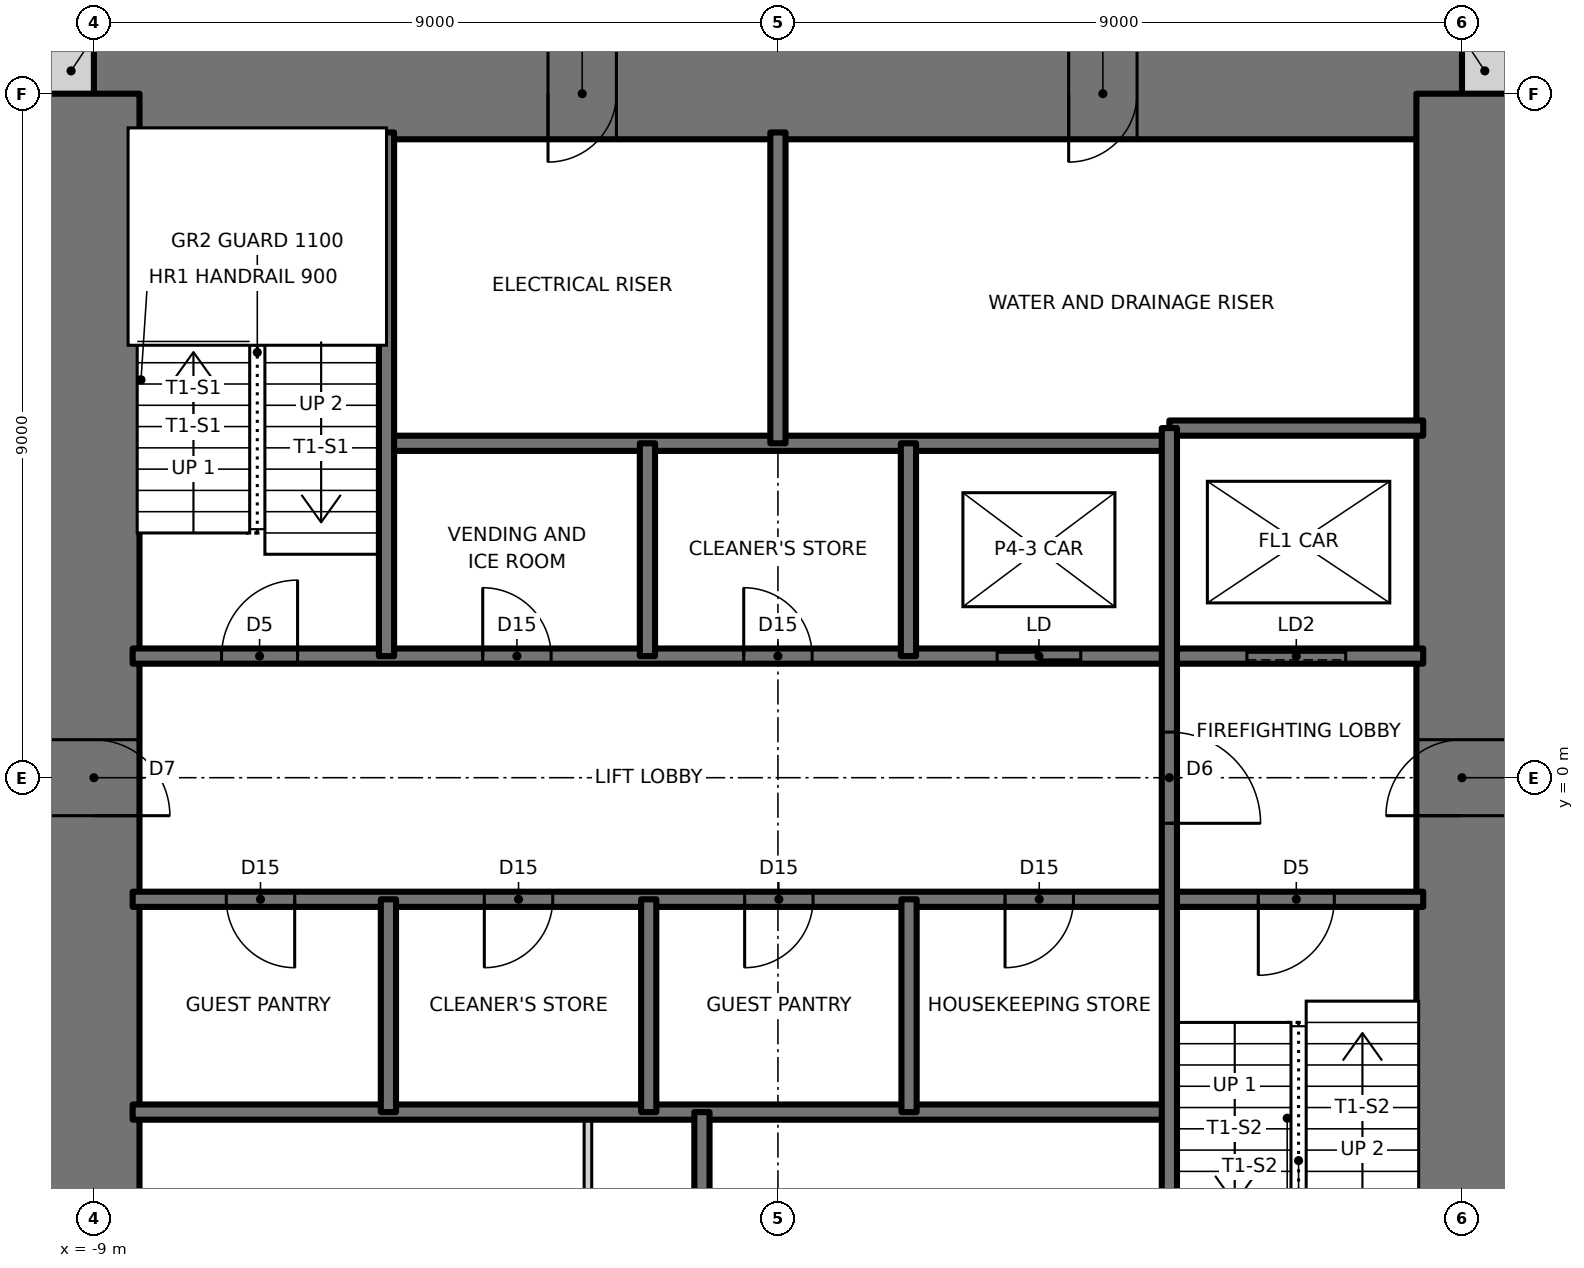
"""IFC4 building model, lengths in metres.
Left out: names, types, materials, properties, quantities, classifications, styles, units other than length and angle.
Written with IfcOpenShell. Run it as: python <this file> out.ifc"""

import sys

from ifc_helpers import new_model, si_unit, direction, frame, frame_2d, origin, place, context, subcontext, project, spatial, rectangle, extrude, element, fill, save


model = new_model("IFC4")
c1 = context("Model", 3, precision=1e-05, world=origin(), true_north=direction((0.0, 1.0)))
c2 = subcontext(c1, "Body", "Model", "MODEL_VIEW")
j1 = project(units=[si_unit("LENGTHUNIT", "METRE"), si_unit("PLANEANGLEUNIT", "RADIAN")], contexts=[c1])
p1 = place(None, origin())
s1 = spatial("IfcSite", under=j1, at=p1, CompositionType="ELEMENT")
p2 = place(p1, origin())
s2 = spatial("IfcBuilding", under=s1, at=p2, CompositionType="ELEMENT")
p3 = place(p2, frame((0.0, 0.0, 243.0)))
s3 = spatial("IfcBuildingStorey", under=s2, at=p3, CompositionType="ELEMENT", Elevation=243.0)
for number, where, z_axis, x_axis in (
    (1, (9.0, 9.3, 0.0), (0.0, 0.0, 1.0), (1.0, 0.0, 0.0)),
    (2, (-9.6, 9.3, 0.0), (0.0, 0.0, 1.0), (1.0, 0.0, 0.0)),
):
    element("IfcWall", number, at=place(p3, frame(where, z_axis=z_axis, x_axis=x_axis)), inside=s3, PredefinedType="SOLIDWALL", context=c2, shape_type="SweptSolid", body=[
        extrude(rectangle(XDim=0.6, YDim=0.6, at=frame_2d((0.3, 0.0))), origin(), (0.0, 0.0, 1.0), 3.5),
    ])
p4 = place(p3, frame((9.0, 9.0, 0.0), z_axis=(0.0, 0.0, 1.0), x_axis=(-1.0, 0.0, 0.0)))
e3 = element("IfcWall", 3, at=p4, inside=s3, PredefinedType="SHEAR", context=c2, shape_type="SweptSolid", body=[
    extrude(rectangle(XDim=18.0, YDim=1.2, at=frame_2d((9.0, 0.0))), origin(), (0.0, 0.0, 1.0), 3.5),
])
p5 = place(p4, frame((11.125, 0.0, 0.0)))
e4 = element("IfcOpeningElement", 4, at=p5, cuts=e3, PredefinedType="OPENING", context=c2, shape_type="SweptSolid", body=[
    extrude(rectangle(XDim=0.9, YDim=2.1, at=frame_2d((0.45, 1.05))), frame((0.0, 0.61, 0.0), z_axis=(0.0, -1.0, 0.0), x_axis=(1.0, 0.0, 0.0)), (0.0, 0.0, 1.0), 1.22),
])
p6 = place(p4, frame((4.275, 0.0, 0.0)))
e5 = element("IfcOpeningElement", 5, at=p6, cuts=e3, PredefinedType="OPENING", context=c2, shape_type="SweptSolid", body=[
    extrude(rectangle(XDim=0.9, YDim=2.1, at=frame_2d((0.45, 1.05))), frame((0.0, 0.61, 0.0), z_axis=(0.0, -1.0, 0.0), x_axis=(1.0, 0.0, 0.0)), (0.0, 0.0, 1.0), 1.22),
])
p7 = place(p3, frame((9.0, -9.0, 0.0), z_axis=(0.0, 0.0, 1.0), x_axis=(0.0, 1.0, 0.0)))
e6 = element("IfcWall", 6, at=p7, inside=s3, PredefinedType="SHEAR", context=c2, shape_type="SweptSolid", body=[
    extrude(rectangle(XDim=18.0, YDim=1.2, at=frame_2d((9.0, 0.0))), origin(), (0.0, 0.0, 1.0), 3.5),
])
p8 = place(p7, frame((8.5, 0.0, 0.0)))
e7 = element("IfcOpeningElement", 7, at=p8, cuts=e6, PredefinedType="OPENING", context=c2, shape_type="SweptSolid", body=[
    extrude(rectangle(XDim=1.0, YDim=2.1, at=frame_2d((0.5, 1.05))), frame((0.0, 0.61, 0.0), z_axis=(0.0, -1.0, 0.0), x_axis=(1.0, 0.0, 0.0)), (0.0, 0.0, 1.0), 1.22),
])
p9 = place(p3, frame((-9.0, 9.0, 0.0), z_axis=(0.0, 0.0, 1.0), x_axis=(0.0, -1.0, 0.0)))
e8 = element("IfcWall", 8, at=p9, inside=s3, PredefinedType="SHEAR", context=c2, shape_type="SweptSolid", body=[
    extrude(rectangle(XDim=18.0, YDim=1.2, at=frame_2d((9.0, 0.0))), origin(), (0.0, 0.0, 1.0), 3.5),
])
p10 = place(p9, frame((8.5, 0.0, 0.0)))
e9 = element("IfcOpeningElement", 9, at=p10, cuts=e8, PredefinedType="OPENING", context=c2, shape_type="SweptSolid", body=[
    extrude(rectangle(XDim=1.0, YDim=2.1, at=frame_2d((0.5, 1.05))), frame((0.0, 0.61, 0.0), z_axis=(0.0, -1.0, 0.0), x_axis=(1.0, 0.0, 0.0)), (0.0, 0.0, 1.0), 1.22),
])
p11 = place(p3, frame((-8.49, -4.4, 0.0), z_axis=(0.0, 0.0, 1.0), x_axis=(1.0, 0.0, 0.0)))
e10 = element("IfcWall", 10, at=p11, inside=s3, PredefinedType="SOLIDWALL", context=c2, shape_type="SweptSolid", body=[
    extrude(rectangle(XDim=13.64, YDim=0.2, at=frame_2d((6.82, 0.0))), origin(), (0.0, 0.0, 1.0), 3.5),
])
p12 = place(p3, frame((-8.49, -1.6, 0.0), z_axis=(0.0, 0.0, 1.0), x_axis=(1.0, 0.0, 0.0)))
e11 = element("IfcWall", 11, at=p12, inside=s3, PredefinedType="SOLIDWALL", context=c2, shape_type="SweptSolid", body=[
    extrude(rectangle(XDim=16.98, YDim=0.2, at=frame_2d((8.49, 0.0))), origin(), (0.0, 0.0, 1.0), 3.5),
])
p13 = place(p12, frame((14.81, 0.0, 0.0)))
e12 = element("IfcOpeningElement", 12, at=p13, cuts=e11, PredefinedType="OPENING", context=c2, shape_type="SweptSolid", body=[
    extrude(rectangle(XDim=1.0, YDim=2.1, at=frame_2d((0.5, 1.05))), frame((0.0, 0.11, 0.0), z_axis=(0.0, -1.0, 0.0), x_axis=(1.0, 0.0, 0.0)), (0.0, 0.0, 1.0), 0.22),
])
p14 = place(p12, frame((1.232, 0.0, 0.0)))
e13 = element("IfcOpeningElement", 13, at=p14, cuts=e11, PredefinedType="OPENING", context=c2, shape_type="SweptSolid", body=[
    extrude(rectangle(XDim=0.9, YDim=2.1, at=frame_2d((0.45, 1.05))), frame((0.0, 0.11, 0.0), z_axis=(0.0, -1.0, 0.0), x_axis=(1.0, 0.0, 0.0)), (0.0, 0.0, 1.0), 0.22),
])
p15 = place(p12, frame((4.627, 0.0, 0.0)))
e14 = element("IfcOpeningElement", 14, at=p15, cuts=e11, PredefinedType="OPENING", context=c2, shape_type="SweptSolid", body=[
    extrude(rectangle(XDim=0.9, YDim=2.1, at=frame_2d((0.45, 1.05))), frame((0.0, 0.11, 0.0), z_axis=(0.0, -1.0, 0.0), x_axis=(1.0, 0.0, 0.0)), (0.0, 0.0, 1.0), 0.22),
])
p16 = place(p12, frame((8.052, 0.0, 0.0)))
e15 = element("IfcOpeningElement", 15, at=p16, cuts=e11, PredefinedType="OPENING", context=c2, shape_type="SweptSolid", body=[
    extrude(rectangle(XDim=0.9, YDim=2.1, at=frame_2d((0.45, 1.05))), frame((0.0, 0.11, 0.0), z_axis=(0.0, -1.0, 0.0), x_axis=(1.0, 0.0, 0.0)), (0.0, 0.0, 1.0), 0.22),
])
p17 = place(p12, frame((11.478, 0.0, 0.0)))
e16 = element("IfcOpeningElement", 16, at=p17, cuts=e11, PredefinedType="OPENING", context=c2, shape_type="SweptSolid", body=[
    extrude(rectangle(XDim=0.9, YDim=2.1, at=frame_2d((0.45, 1.05))), frame((0.0, 0.11, 0.0), z_axis=(0.0, -1.0, 0.0), x_axis=(1.0, 0.0, 0.0)), (0.0, 0.0, 1.0), 0.22),
])
p18 = place(p3, frame((-8.49, 1.6, 0.0), z_axis=(0.0, 0.0, 1.0), x_axis=(1.0, 0.0, 0.0)))
e17 = element("IfcWall", 17, at=p18, inside=s3, PredefinedType="SOLIDWALL", context=c2, shape_type="SweptSolid", body=[
    extrude(rectangle(XDim=16.98, YDim=0.2, at=frame_2d((8.49, 0.0))), origin(), (0.0, 0.0, 1.0), 3.5),
])
p19 = place(p18, frame((1.17, 0.0, 0.0)))
e18 = element("IfcOpeningElement", 18, at=p19, cuts=e17, PredefinedType="OPENING", context=c2, shape_type="SweptSolid", body=[
    extrude(rectangle(XDim=1.0, YDim=2.1, at=frame_2d((0.5, 1.05))), frame((0.0, 0.11, 0.0), z_axis=(0.0, -1.0, 0.0), x_axis=(1.0, 0.0, 0.0)), (0.0, 0.0, 1.0), 0.22),
])
p20 = place(p18, frame((4.606, 0.0, 0.0)))
e19 = element("IfcOpeningElement", 19, at=p20, cuts=e17, PredefinedType="OPENING", context=c2, shape_type="SweptSolid", body=[
    extrude(rectangle(XDim=0.9, YDim=2.1, at=frame_2d((0.45, 1.05))), frame((0.0, 0.11, 0.0), z_axis=(0.0, -1.0, 0.0), x_axis=(1.0, 0.0, 0.0)), (0.0, 0.0, 1.0), 0.22),
])
p21 = place(p18, frame((8.04, 0.0, 0.0)))
e20 = element("IfcOpeningElement", 20, at=p21, cuts=e17, PredefinedType="OPENING", context=c2, shape_type="SweptSolid", body=[
    extrude(rectangle(XDim=0.9, YDim=2.1, at=frame_2d((0.45, 1.05))), frame((0.0, 0.11, 0.0), z_axis=(0.0, -1.0, 0.0), x_axis=(1.0, 0.0, 0.0)), (0.0, 0.0, 1.0), 0.22),
])
p22 = place(p18, frame((11.374, 0.0, 0.0)))
e21 = element("IfcOpeningElement", 21, at=p22, cuts=e17, PredefinedType="OPENING", context=c2, shape_type="SweptSolid", body=[
    extrude(rectangle(XDim=1.1, YDim=2.1, at=frame_2d((0.55, 1.05))), frame((0.0, 0.11, 0.0), z_axis=(0.0, -1.0, 0.0), x_axis=(1.0, 0.0, 0.0)), (0.0, 0.0, 1.0), 0.22),
])
p23 = place(p18, frame((14.66, 0.0, 0.0)))
e22 = element("IfcOpeningElement", 22, at=p23, cuts=e17, PredefinedType="OPENING", context=c2, shape_type="SweptSolid", body=[
    extrude(rectangle(XDim=1.3, YDim=2.1, at=frame_2d((0.65, 1.05))), frame((0.0, 0.11, 0.0), z_axis=(0.0, -1.0, 0.0), x_axis=(1.0, 0.0, 0.0)), (0.0, 0.0, 1.0), 0.22),
])
p24 = place(p3, frame((-5.15, 4.4, 0.0), z_axis=(0.0, 0.0, 1.0), x_axis=(1.0, 0.0, 0.0)))
e23 = element("IfcWall", 23, at=p24, inside=s3, PredefinedType="SOLIDWALL", context=c2, shape_type="SweptSolid", body=[
    extrude(rectangle(XDim=10.3, YDim=0.2, at=frame_2d((5.15, 0.0))), origin(), (0.0, 0.0, 1.0), 3.5),
])
p25 = place(p3, frame((5.15, 4.6, 0.0), z_axis=(0.0, 0.0, 1.0), x_axis=(1.0, 0.0, 0.0)))
e24 = element("IfcWall", 24, at=p25, inside=s3, PredefinedType="SOLIDWALL", context=c2, shape_type="SweptSolid", body=[
    extrude(rectangle(XDim=3.34, YDim=0.2, at=frame_2d((1.67, 0.0))), origin(), (0.0, 0.0, 1.0), 3.5),
])
p26 = place(p3, frame((5.15, -8.49, 0.0), z_axis=(0.0, 0.0, 1.0), x_axis=(0.0, 1.0, 0.0)))
e25 = element("IfcWall", 25, at=p26, inside=s3, PredefinedType="SOLIDWALL", context=c2, shape_type="SweptSolid", body=[
    extrude(rectangle(XDim=13.09, YDim=0.2, at=frame_2d((6.545, 0.0))), origin(), (0.0, 0.0, 1.0), 3.5),
])
p27 = place(p26, frame((7.89, 0.0, 0.0)))
e26 = element("IfcOpeningElement", 26, at=p27, cuts=e25, PredefinedType="OPENING", context=c2, shape_type="SweptSolid", body=[
    extrude(rectangle(XDim=1.2, YDim=2.1, at=frame_2d((0.6, 1.05))), frame((0.0, 0.11, 0.0), z_axis=(0.0, -1.0, 0.0), x_axis=(1.0, 0.0, 0.0)), (0.0, 0.0, 1.0), 0.22),
])
for number, where, z_axis, x_axis in (
    (27, (1.725, -4.4, 0.0), (0.0, 0.0, 1.0), (0.0, 1.0, 0.0)),
    (28, (1.717, 1.6, 0.0), (0.0, 0.0, 1.0), (0.0, 1.0, 0.0)),
):
    element("IfcWall", number, at=place(p3, frame(where, z_axis=z_axis, x_axis=x_axis)), inside=s3, PredefinedType="SOLIDWALL", context=c2, shape_type="SweptSolid", body=[
        extrude(rectangle(XDim=2.8, YDim=0.2, at=frame_2d((1.4, 0.0))), origin(), (0.0, 0.0, 1.0), 3.5),
    ])
for number, where, z_axis, x_axis in (
    (29, (0.0, 4.4, 0.0), (0.0, 0.0, 1.0), (0.0, 1.0, 0.0)),
    (30, (-1.0, -8.49, 0.0), (0.0, 0.0, 1.0), (0.0, 1.0, 0.0)),
):
    element("IfcWall", number, at=place(p3, frame(where, z_axis=z_axis, x_axis=x_axis)), inside=s3, PredefinedType="SOLIDWALL", context=c2, shape_type="SweptSolid", body=[
        extrude(rectangle(XDim=4.09, YDim=0.2, at=frame_2d((2.045, 0.0))), origin(), (0.0, 0.0, 1.0), 3.5),
    ])
for number, where, z_axis, x_axis in (
    (31, (-1.7, -4.4, 0.0), (0.0, 0.0, 1.0), (0.0, 1.0, 0.0)),
    (32, (-1.717, 1.6, 0.0), (0.0, 0.0, 1.0), (0.0, 1.0, 0.0)),
):
    element("IfcWall", number, at=place(p3, frame(where, z_axis=z_axis, x_axis=x_axis)), inside=s3, PredefinedType="SOLIDWALL", context=c2, shape_type="SweptSolid", body=[
        extrude(rectangle(XDim=2.8, YDim=0.2, at=frame_2d((1.4, 0.0))), origin(), (0.0, 0.0, 1.0), 3.5),
    ])
p28 = place(p3, frame((-2.5, -8.49, 0.0), z_axis=(0.0, 0.0, 1.0), x_axis=(0.0, 1.0, 0.0)))
e33 = element("IfcWall", 33, at=p28, inside=s3, PredefinedType="PARTITIONING", context=c2, shape_type="SweptSolid", body=[
    extrude(rectangle(XDim=4.09, YDim=0.1, at=frame_2d((2.045, 0.0))), origin(), (0.0, 0.0, 1.0), 3.3),
])
p29 = place(p28, frame((1.595, 0.0, 0.0)))
e34 = element("IfcOpeningElement", 34, at=p29, cuts=e33, PredefinedType="OPENING", context=c2, shape_type="SweptSolid", body=[
    extrude(rectangle(XDim=0.9, YDim=2.1, at=frame_2d((0.45, 1.05))), frame((0.0, 0.06, 0.0), z_axis=(0.0, -1.0, 0.0), x_axis=(1.0, 0.0, 0.0)), (0.0, 0.0, 1.0), 0.12),
])
p30 = place(p3, frame((-5.125, -4.4, 0.0), z_axis=(0.0, 0.0, 1.0), x_axis=(0.0, 1.0, 0.0)))
e35 = element("IfcWall", 35, at=p30, inside=s3, PredefinedType="SOLIDWALL", context=c2, shape_type="SweptSolid", body=[
    extrude(rectangle(XDim=2.8, YDim=0.2, at=frame_2d((1.4, 0.0))), origin(), (0.0, 0.0, 1.0), 3.5),
])
p31 = place(p3, frame((-5.15, 1.6, 0.0), z_axis=(0.0, 0.0, 1.0), x_axis=(0.0, 1.0, 0.0)))
e36 = element("IfcWall", 36, at=p31, inside=s3, PredefinedType="SOLIDWALL", context=c2, shape_type="SweptSolid", body=[
    extrude(rectangle(XDim=6.89, YDim=0.2, at=frame_2d((3.445, 0.0))), origin(), (0.0, 0.0, 1.0), 3.5),
])
p32 = place(p19, origin())
e37 = element("IfcDoor", 37, at=p32, inside=s3, OperationType="SINGLE_SWING_RIGHT", PredefinedType="DOOR", context=c2, shape_type="SweptSolid", body=[
    extrude(rectangle(XDim=1.0, YDim=2.1, at=frame_2d((0.5, 1.05))), frame((0.0, 0.025, 0.0), z_axis=(0.0, -1.0, 0.0), x_axis=(1.0, 0.0, 0.0)), (0.0, 0.0, 1.0), 0.05),
])
fill(e18, e37)
p33 = place(p13, frame((1.0, 0.0, 0.0), z_axis=(0.0, 0.0, 1.0), x_axis=(-1.0, 0.0, 0.0)))
e38 = element("IfcDoor", 38, at=p33, inside=s3, OperationType="SINGLE_SWING_RIGHT", PredefinedType="DOOR", context=c2, shape_type="SweptSolid", body=[
    extrude(rectangle(XDim=1.0, YDim=2.1, at=frame_2d((0.5, 1.05))), frame((0.0, 0.025, 0.0), z_axis=(0.0, -1.0, 0.0), x_axis=(1.0, 0.0, 0.0)), (0.0, 0.0, 1.0), 0.05),
])
fill(e12, e38)
p34 = place(p27, frame((1.2, 0.0, 0.0), z_axis=(0.0, 0.0, 1.0), x_axis=(-1.0, 0.0, 0.0)))
e39 = element("IfcDoor", 39, at=p34, inside=s3, OperationType="SINGLE_SWING_RIGHT", PredefinedType="DOOR", context=c2, shape_type="SweptSolid", body=[
    extrude(rectangle(XDim=1.2, YDim=2.1, at=frame_2d((0.6, 1.05))), frame((0.0, 0.025, 0.0), z_axis=(0.0, -1.0, 0.0), x_axis=(1.0, 0.0, 0.0)), (0.0, 0.0, 1.0), 0.05),
])
fill(e26, e39)
p35 = place(p20, origin())
e40 = element("IfcDoor", 40, at=p35, inside=s3, OperationType="SINGLE_SWING_LEFT", PredefinedType="DOOR", context=c2, shape_type="SweptSolid", body=[
    extrude(rectangle(XDim=0.9, YDim=2.1, at=frame_2d((0.45, 1.05))), frame((0.0, 0.025, 0.0), z_axis=(0.0, -1.0, 0.0), x_axis=(1.0, 0.0, 0.0)), (0.0, 0.0, 1.0), 0.05),
])
fill(e19, e40)
p36 = place(p21, origin())
e41 = element("IfcDoor", 41, at=p36, inside=s3, OperationType="SINGLE_SWING_LEFT", PredefinedType="DOOR", context=c2, shape_type="SweptSolid", body=[
    extrude(rectangle(XDim=0.9, YDim=2.1, at=frame_2d((0.45, 1.05))), frame((0.0, 0.025, 0.0), z_axis=(0.0, -1.0, 0.0), x_axis=(1.0, 0.0, 0.0)), (0.0, 0.0, 1.0), 0.05),
])
fill(e20, e41)
p37 = place(p14, frame((0.9, 0.0, 0.0), z_axis=(0.0, 0.0, 1.0), x_axis=(-1.0, 0.0, 0.0)))
e42 = element("IfcDoor", 42, at=p37, inside=s3, OperationType="SINGLE_SWING_LEFT", PredefinedType="DOOR", context=c2, shape_type="SweptSolid", body=[
    extrude(rectangle(XDim=0.9, YDim=2.1, at=frame_2d((0.45, 1.05))), frame((0.0, 0.025, 0.0), z_axis=(0.0, -1.0, 0.0), x_axis=(1.0, 0.0, 0.0)), (0.0, 0.0, 1.0), 0.05),
])
fill(e13, e42)
p38 = place(p15, frame((0.9, 0.0, 0.0), z_axis=(0.0, 0.0, 1.0), x_axis=(-1.0, 0.0, 0.0)))
e43 = element("IfcDoor", 43, at=p38, inside=s3, OperationType="SINGLE_SWING_RIGHT", PredefinedType="DOOR", context=c2, shape_type="SweptSolid", body=[
    extrude(rectangle(XDim=0.9, YDim=2.1, at=frame_2d((0.45, 1.05))), frame((0.0, 0.025, 0.0), z_axis=(0.0, -1.0, 0.0), x_axis=(1.0, 0.0, 0.0)), (0.0, 0.0, 1.0), 0.05),
])
fill(e14, e43)
p39 = place(p16, frame((0.9, 0.0, 0.0), z_axis=(0.0, 0.0, 1.0), x_axis=(-1.0, 0.0, 0.0)))
e44 = element("IfcDoor", 44, at=p39, inside=s3, OperationType="SINGLE_SWING_RIGHT", PredefinedType="DOOR", context=c2, shape_type="SweptSolid", body=[
    extrude(rectangle(XDim=0.9, YDim=2.1, at=frame_2d((0.45, 1.05))), frame((0.0, 0.025, 0.0), z_axis=(0.0, -1.0, 0.0), x_axis=(1.0, 0.0, 0.0)), (0.0, 0.0, 1.0), 0.05),
])
fill(e15, e44)
p40 = place(p17, frame((0.9, 0.0, 0.0), z_axis=(0.0, 0.0, 1.0), x_axis=(-1.0, 0.0, 0.0)))
e45 = element("IfcDoor", 45, at=p40, inside=s3, OperationType="SINGLE_SWING_RIGHT", PredefinedType="DOOR", context=c2, shape_type="SweptSolid", body=[
    extrude(rectangle(XDim=0.9, YDim=2.1, at=frame_2d((0.45, 1.05))), frame((0.0, 0.025, 0.0), z_axis=(0.0, -1.0, 0.0), x_axis=(1.0, 0.0, 0.0)), (0.0, 0.0, 1.0), 0.05),
])
fill(e16, e45)
p41 = place(p10, origin())
e46 = element("IfcDoor", 46, at=p41, inside=s3, OperationType="SINGLE_SWING_RIGHT", PredefinedType="DOOR", context=c2, shape_type="SweptSolid", body=[
    extrude(rectangle(XDim=1.0, YDim=2.1, at=frame_2d((0.5, 1.05))), frame((0.0, 0.025, 0.0), z_axis=(0.0, -1.0, 0.0), x_axis=(1.0, 0.0, 0.0)), (0.0, 0.0, 1.0), 0.05),
])
fill(e9, e46)
p42 = place(p8, origin())
e47 = element("IfcDoor", 47, at=p42, inside=s3, OperationType="SINGLE_SWING_LEFT", PredefinedType="DOOR", context=c2, shape_type="SweptSolid", body=[
    extrude(rectangle(XDim=1.0, YDim=2.1, at=frame_2d((0.5, 1.05))), frame((0.0, 0.025, 0.0), z_axis=(0.0, -1.0, 0.0), x_axis=(1.0, 0.0, 0.0)), (0.0, 0.0, 1.0), 0.05),
])
fill(e7, e47)
p43 = place(p5, origin())
e48 = element("IfcDoor", 48, at=p43, inside=s3, OperationType="SINGLE_SWING_RIGHT", PredefinedType="DOOR", context=c2, shape_type="SweptSolid", body=[
    extrude(rectangle(XDim=0.9, YDim=2.1, at=frame_2d((0.45, 1.05))), frame((0.0, 0.025, 0.0), z_axis=(0.0, -1.0, 0.0), x_axis=(1.0, 0.0, 0.0)), (0.0, 0.0, 1.0), 0.05),
])
fill(e4, e48)
p44 = place(p6, origin())
e49 = element("IfcDoor", 49, at=p44, inside=s3, OperationType="SINGLE_SWING_RIGHT", PredefinedType="DOOR", context=c2, shape_type="SweptSolid", body=[
    extrude(rectangle(XDim=0.9, YDim=2.1, at=frame_2d((0.45, 1.05))), frame((0.0, 0.025, 0.0), z_axis=(0.0, -1.0, 0.0), x_axis=(1.0, 0.0, 0.0)), (0.0, 0.0, 1.0), 0.05),
])
fill(e5, e49)
p45 = place(p22, origin())
e50 = element("IfcDoor", 50, at=p45, inside=s3, OperationType="DOUBLE_DOOR_SLIDING", PredefinedType="DOOR", context=c2, shape_type="SweptSolid", body=[
    extrude(rectangle(XDim=1.1, YDim=2.1, at=frame_2d((0.55, 1.05))), frame((0.0, 0.025, 0.0), z_axis=(0.0, -1.0, 0.0), x_axis=(1.0, 0.0, 0.0)), (0.0, 0.0, 1.0), 0.05),
])
fill(e21, e50)
p46 = place(p23, origin())
e51 = element("IfcDoor", 51, at=p46, inside=s3, OperationType="SLIDING_TO_LEFT", PredefinedType="DOOR", context=c2, shape_type="SweptSolid", body=[
    extrude(rectangle(XDim=1.3, YDim=2.1, at=frame_2d((0.65, 1.05))), frame((0.0, 0.025, 0.0), z_axis=(0.0, -1.0, 0.0), x_axis=(1.0, 0.0, 0.0)), (0.0, 0.0, 1.0), 0.05),
])
fill(e22, e51)
save(model, sys.argv[1])
